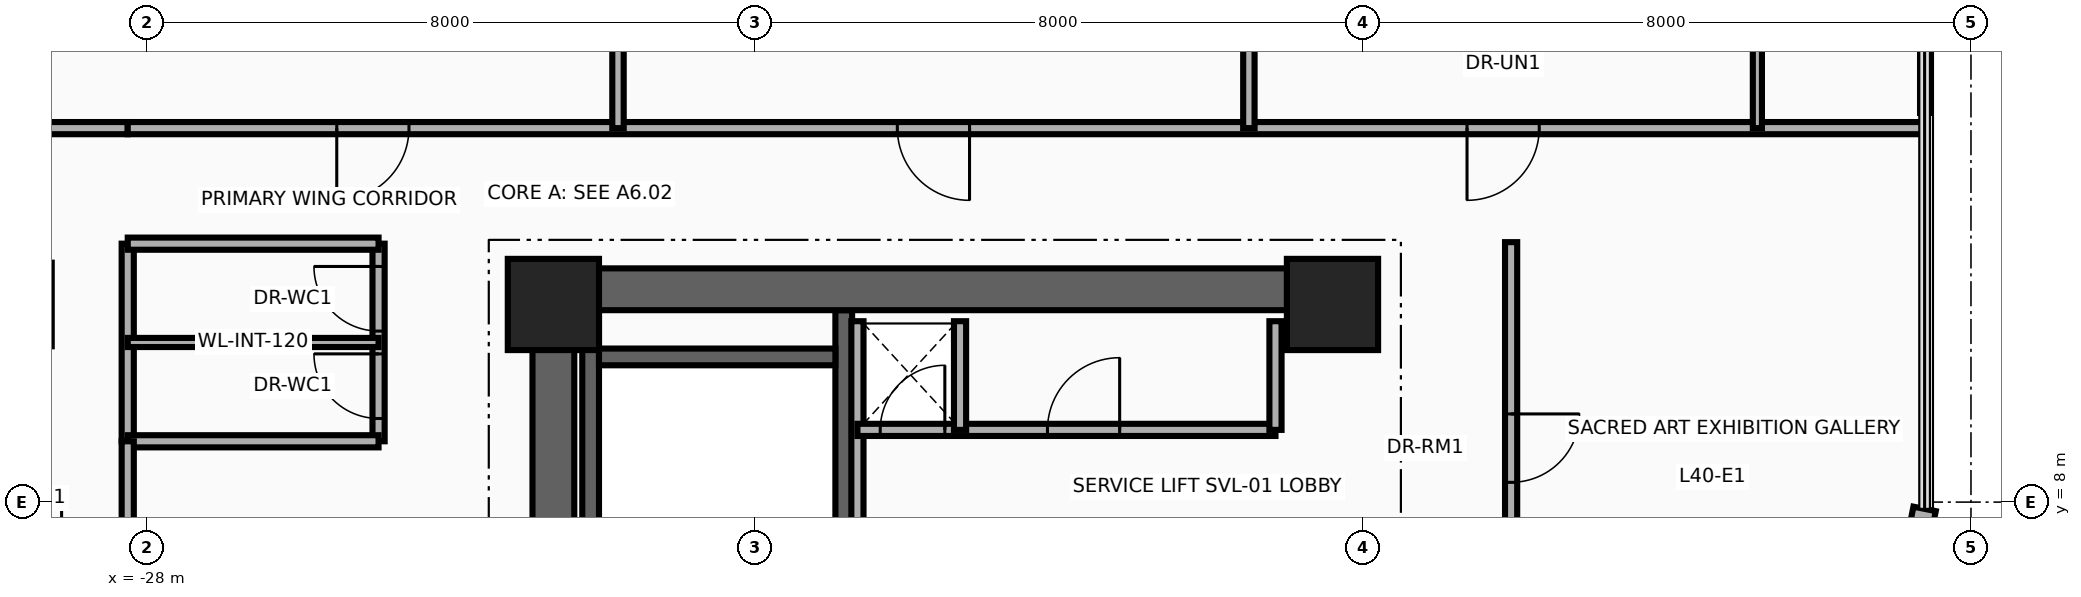
"""IFC4 building model, lengths in metres.
Left out: names, types, materials, properties, quantities, classifications, styles, units other than length and angle.
Written with IfcOpenShell. Run it as: python <this file> out.ifc"""

import sys

from ifc_helpers import new_model, si_unit, direction, frame, frame_2d, origin, origin_2d, place, context, subcontext, project, spatial, rectangle, extrude, source, transform, mapped, element, fill, save


model = new_model("IFC4")
c1 = context("Model", 3, precision=1e-05, world=origin(), true_north=direction((0.0, 1.0)))
c2 = subcontext(c1, "Body", "Model", "MODEL_VIEW")
j1 = project(units=[si_unit("LENGTHUNIT", "METRE"), si_unit("PLANEANGLEUNIT", "RADIAN")], contexts=[c1])
p1 = place(None, origin())
s1 = spatial("IfcSite", under=j1, at=p1, CompositionType="ELEMENT")
p2 = place(p1, origin())
s2 = spatial("IfcBuilding", under=s1, at=p2, CompositionType="ELEMENT")
p3 = place(p2, frame((0.0, 0.0, 157.5)))
s3 = spatial("IfcBuildingStorey", under=s2, at=p3, CompositionType="ELEMENT", Elevation=157.5)
for number, where, z_axis, x_axis in (
    (1, (-22.16, 1.78, 0.0), (0.0, 0.0, 1.0), (0.0, 1.0, 0.0)),
    (2, (-18.83, 1.78, 0.0), (0.0, 0.0, 1.0), (0.0, 1.0, 0.0)),
):
    element("IfcWall", number, at=place(p3, frame(where, z_axis=z_axis, x_axis=x_axis)), inside=s3, PredefinedType="SHEAR", context=c2, shape_type="SweptSolid", body=[
        extrude(rectangle(XDim=8.745, YDim=0.22, at=frame_2d((4.373, 0.0))), origin(), (0.0, 0.0, 1.0), 3.46),
    ])
p4 = place(p3, frame((-22.05, 9.91, 0.0), z_axis=(0.0, 0.0, 1.0), x_axis=(1.0, 0.0, 0.0)))
e3 = element("IfcWall", 3, at=p4, inside=s3, PredefinedType="SHEAR", context=c2, shape_type="SweptSolid", body=[
    extrude(rectangle(XDim=3.11, YDim=0.22, at=frame_2d((1.555, 0.0))), origin(), (0.0, 0.0, 1.0), 3.46),
])
p5 = place(p3, frame((-22.65, -11.075, 0.0), z_axis=(0.0, 0.0, 1.0), x_axis=(0.0, 1.0, 0.0)))
e4 = element("IfcWall", 4, at=p5, inside=s3, PredefinedType="SHEAR", context=c2, shape_type="SweptSolid", body=[
    extrude(rectangle(XDim=22.15, YDim=0.55, at=frame_2d((11.075, 0.0))), origin(), (0.0, 0.0, 1.0), 3.46),
])
p6 = place(p3, frame((-22.65, 10.8, 0.0), z_axis=(0.0, 0.0, 1.0), x_axis=(1.0, 0.0, 0.0)))
e5 = element("IfcWall", 5, at=p6, inside=s3, PredefinedType="SHEAR", context=c2, shape_type="SweptSolid", body=[
    extrude(rectangle(XDim=10.25, YDim=0.55, at=frame_2d((5.125, 0.0))), origin(), (0.0, 0.0, 1.0), 3.46),
])
m1 = source(origin(), c2, "Body", "SweptSolid", [
    extrude(rectangle(XDim=1.2, YDim=1.2, at=origin_2d()), origin(), (0.0, 0.0, 1.0), 3.7),
])
for number, where, z_axis, x_axis in (
    (6, (-22.65, 10.6, 0.0), (0.0, 0.0, 1.0), (1.0, 0.0, 0.0)),
    (7, (-12.4, 10.6, 0.0), (0.0, 0.0, 1.0), (1.0, 0.0, 0.0)),
):
    element("IfcColumn", number, at=place(p3, frame(where, z_axis=z_axis, x_axis=x_axis)), inside=s3, PredefinedType="COLUMN", context=c2, shape_type="MappedRepresentation", body=[
        mapped(m1, transform((0.0, 0.0, 0.0), x_axis=(1.0, 0.0, 0.0), y_axis=(0.0, 1.0, 0.0), z_axis=(0.0, 0.0, 1.0), scale=1.0)),
    ])
p7 = place(p3, frame((-4.61, 7.911, 0.0), z_axis=(0.0, 0.0, 1.0), x_axis=(-0.194989739953, -0.980805282058, 0.0)))
e8 = element("IfcWall", 8, at=p7, inside=s3, PredefinedType="SOLIDWALL", context=c2, shape_type="SweptSolid", body=[
    extrude(rectangle(XDim=0.709, YDim=0.3, at=frame_2d((0.354, 0.0))), origin(), (0.0, 0.0, 1.0), 3.46),
])
p8 = place(p3, frame((-18.65, 7.45, 0.0), z_axis=(0.0, 0.0, 1.0), x_axis=(0.0, 1.0, 0.0)))
e9 = element("IfcWall", 9, at=p8, inside=s3, PredefinedType="PARTITIONING", context=c2, shape_type="SweptSolid", body=[
    extrude(rectangle(XDim=2.93, YDim=0.16, at=frame_2d((1.465, 0.0))), origin(), (0.0, 0.0, 1.0), 3.46),
])
p9 = place(p3, frame((-18.65, 8.95, 0.0), z_axis=(0.0, 0.0, 1.0), x_axis=(1.0, 0.0, 0.0)))
e10 = element("IfcWall", 10, at=p9, inside=s3, PredefinedType="PARTITIONING", context=c2, shape_type="SweptSolid", body=[
    extrude(rectangle(XDim=5.5, YDim=0.16, at=frame_2d((2.75, 0.0))), origin(), (0.0, 0.0, 1.0), 3.46),
])
p10 = place(p9, frame((0.3, 0.0, 0.0)))
e11 = element("IfcOpeningElement", 11, at=p10, cuts=e10, PredefinedType="OPENING", context=c2, shape_type="SweptSolid", body=[
    extrude(rectangle(XDim=0.85, YDim=2.05, at=frame_2d((0.425, 1.025))), frame((0.0, 0.095, 0.0), z_axis=(0.0, -1.0, 0.0), x_axis=(1.0, 0.0, 0.0)), (0.0, 0.0, 1.0), 0.19),
])
p11 = place(p9, frame((2.5, 0.0, 0.0)))
e12 = element("IfcOpeningElement", 12, at=p11, cuts=e10, PredefinedType="OPENING", context=c2, shape_type="SweptSolid", body=[
    extrude(rectangle(XDim=0.95, YDim=2.15, at=frame_2d((0.475, 1.075))), frame((0.0, 0.095, 0.0), z_axis=(0.0, -1.0, 0.0), x_axis=(1.0, 0.0, 0.0)), (0.0, 0.0, 1.0), 0.19),
])
for number, where, z_axis, x_axis in (
    (13, (-13.15, 8.95, 0.0), (0.0, 0.0, 1.0), (0.0, 1.0, 0.0)),
    (14, (-17.3, 8.95, 0.0), (0.0, 0.0, 1.0), (0.0, 1.0, 0.0)),
):
    element("IfcWall", number, at=place(p3, frame(where, z_axis=z_axis, x_axis=x_axis)), inside=s3, PredefinedType="PARTITIONING", context=c2, shape_type="SweptSolid", body=[
        extrude(rectangle(XDim=1.43, YDim=0.16, at=frame_2d((0.715, 0.0))), origin(), (0.0, 0.0, 1.0), 3.46),
    ])
p12 = place(p3, frame((-28.25, 8.8, 0.0), z_axis=(0.0, 0.0, 1.0), x_axis=(0.0, 1.0, 0.0)))
e15 = element("IfcWall", 15, at=p12, inside=s3, PredefinedType="PARTITIONING", context=c2, shape_type="SweptSolid", body=[
    extrude(rectangle(XDim=2.6, YDim=0.16, at=frame_2d((1.3, 0.0))), origin(), (0.0, 0.0, 1.0), 2.666),
])
p13 = place(p3, frame((-24.95, 8.8, 0.0), z_axis=(0.0, 0.0, 1.0), x_axis=(0.0, 1.0, 0.0)))
e16 = element("IfcWall", 16, at=p13, inside=s3, PredefinedType="PARTITIONING", context=c2, shape_type="SweptSolid", body=[
    extrude(rectangle(XDim=2.6, YDim=0.16, at=frame_2d((1.3, 0.0))), origin(), (0.0, 0.0, 1.0), 2.666),
])
p14 = place(p13, frame((0.3, 0.0, 0.0)))
e17 = element("IfcOpeningElement", 17, at=p14, cuts=e16, PredefinedType="OPENING", context=c2, shape_type="SweptSolid", body=[
    extrude(rectangle(XDim=0.85, YDim=2.1, at=frame_2d((0.425, 1.05))), frame((0.0, 0.095, 0.0), z_axis=(0.0, -1.0, 0.0), x_axis=(1.0, 0.0, 0.0)), (0.0, 0.0, 1.0), 0.19),
])
p15 = place(p13, frame((1.45, 0.0, 0.0)))
e18 = element("IfcOpeningElement", 18, at=p15, cuts=e16, PredefinedType="OPENING", context=c2, shape_type="SweptSolid", body=[
    extrude(rectangle(XDim=0.85, YDim=2.1, at=frame_2d((0.425, 1.05))), frame((0.0, 0.095, 0.0), z_axis=(0.0, -1.0, 0.0), x_axis=(1.0, 0.0, 0.0)), (0.0, 0.0, 1.0), 0.19),
])
for number, where, z_axis, x_axis in (
    (19, (-28.25, 8.8, 0.0), (0.0, 0.0, 1.0), (1.0, 0.0, 0.0)),
    (20, (-28.25, 11.4, 0.0), (0.0, 0.0, 1.0), (1.0, 0.0, 0.0)),
):
    element("IfcWall", number, at=place(p3, frame(where, z_axis=z_axis, x_axis=x_axis)), inside=s3, PredefinedType="PARTITIONING", context=c2, shape_type="SweptSolid", body=[
        extrude(rectangle(XDim=3.3, YDim=0.16, at=frame_2d((1.65, 0.0))), origin(), (0.0, 0.0, 1.0), 3.46),
    ])
p16 = place(p3, frame((-28.25, 10.1, 0.0), z_axis=(0.0, 0.0, 1.0), x_axis=(1.0, 0.0, 0.0)))
e21 = element("IfcWall", 21, at=p16, inside=s3, PredefinedType="PARTITIONING", context=c2, shape_type="SweptSolid", body=[
    extrude(rectangle(XDim=3.3, YDim=0.12, at=frame_2d((1.65, 0.0))), origin(), (0.0, 0.0, 1.0), 3.46),
])
p17 = place(p3, frame((-28.25, 7.2, 0.0), z_axis=(0.0, 0.0, 1.0), x_axis=(0.0, 1.0, 0.0)))
e22 = element("IfcWall", 22, at=p17, inside=s3, PredefinedType="PARTITIONING", context=c2, shape_type="SweptSolid", body=[
    extrude(rectangle(XDim=1.6, YDim=0.16, at=frame_2d((0.8, 0.0))), origin(), (0.0, 0.0, 1.0), 2.988),
])
p18 = place(p3, frame((-32.54, 12.92, 0.0), z_axis=(0.0, 0.0, 1.0), x_axis=(1.0, 0.0, 0.0)))
e23 = element("IfcWall", 23, at=p18, inside=s3, PredefinedType="PARTITIONING", context=c2, shape_type="SweptSolid", body=[
    extrude(rectangle(XDim=4.29, YDim=0.16, at=frame_2d((2.145, 0.0))), origin(), (0.0, 0.0, 1.0), 2.896),
])
p19 = place(p3, frame((-28.25, 12.92, 0.0), z_axis=(0.0, 0.0, 1.0), x_axis=(1.0, 0.0, 0.0)))
e24 = element("IfcWall", 24, at=p19, inside=s3, PredefinedType="PARTITIONING", context=c2, shape_type="SweptSolid", body=[
    extrude(rectangle(XDim=23.64, YDim=0.16, at=frame_2d((11.82, 0.0))), origin(), (0.0, 0.0, 1.0), 2.834),
])
p20 = place(p19, frame((2.75, 0.0, 0.0)))
e25 = element("IfcOpeningElement", 25, at=p20, cuts=e24, PredefinedType="OPENING", context=c2, shape_type="SweptSolid", body=[
    extrude(rectangle(XDim=0.95, YDim=2.15, at=frame_2d((0.475, 1.075))), frame((0.0, 0.095, 0.0), z_axis=(0.0, -1.0, 0.0), x_axis=(1.0, 0.0, 0.0)), (0.0, 0.0, 1.0), 0.19),
])
p21 = place(p19, frame((10.125, 0.0, 0.0)))
e26 = element("IfcOpeningElement", 26, at=p21, cuts=e24, PredefinedType="OPENING", context=c2, shape_type="SweptSolid", body=[
    extrude(rectangle(XDim=0.95, YDim=2.15, at=frame_2d((0.475, 1.075))), frame((0.0, 0.095, 0.0), z_axis=(0.0, -1.0, 0.0), x_axis=(1.0, 0.0, 0.0)), (0.0, 0.0, 1.0), 0.19),
])
p22 = place(p19, frame((17.62, 0.0, 0.0)))
e27 = element("IfcOpeningElement", 27, at=p22, cuts=e24, PredefinedType="OPENING", context=c2, shape_type="SweptSolid", body=[
    extrude(rectangle(XDim=0.95, YDim=2.15, at=frame_2d((0.475, 1.075))), frame((0.0, 0.095, 0.0), z_axis=(0.0, -1.0, 0.0), x_axis=(1.0, 0.0, 0.0)), (0.0, 0.0, 1.0), 0.19),
])
p23 = place(p3, frame((-21.8, 12.92, 0.0), z_axis=(0.0, 0.0, 1.0), x_axis=(0.0, 1.0, 0.0)))
e28 = element("IfcWall", 28, at=p23, inside=s3, PredefinedType="PARTITIONING", context=c2, shape_type="SweptSolid", body=[
    extrude(rectangle(XDim=6.256, YDim=0.15, at=frame_2d((3.128, 0.0))), origin(), (0.0, 0.0, 1.0), 2.666),
])
p24 = place(p3, frame((-13.5, 12.92, 0.0), z_axis=(0.0, 0.0, 1.0), x_axis=(0.0, 1.0, 0.0)))
e29 = element("IfcWall", 29, at=p24, inside=s3, PredefinedType="PARTITIONING", context=c2, shape_type="SweptSolid", body=[
    extrude(rectangle(XDim=6.694, YDim=0.15, at=frame_2d((3.347, 0.0))), origin(), (0.0, 0.0, 1.0), 2.666),
])
p25 = place(p3, frame((-6.81, 12.92, 0.0), z_axis=(0.0, 0.0, 1.0), x_axis=(0.0, 1.0, 0.0)))
e30 = element("IfcWall", 30, at=p25, inside=s3, PredefinedType="PARTITIONING", context=c2, shape_type="SweptSolid", body=[
    extrude(rectangle(XDim=2.0, YDim=0.12, at=frame_2d((1.0, 0.0))), origin(), (0.0, 0.0, 1.0), 3.46),
])
p26 = place(p3, frame((-4.61, 13.12, 0.0), z_axis=(0.0, 0.0, 1.0), x_axis=(0.0, 1.0, 0.0)))
e31 = element("IfcWall", 31, at=p26, inside=s3, PredefinedType="PARTITIONING", context=c2, shape_type="SweptSolid", body=[
    extrude(rectangle(XDim=1.62, YDim=0.12, at=frame_2d((0.81, 0.0))), origin(), (0.0, 0.0, 1.0), 3.46),
])
p27 = place(p3, frame((-10.05, 6.0, 0.0), z_axis=(0.0, 0.0, 1.0), x_axis=(0.0, 1.0, 0.0)))
e32 = element("IfcWall", 32, at=p27, inside=s3, PredefinedType="PARTITIONING", context=c2, shape_type="SweptSolid", body=[
    extrude(rectangle(XDim=5.42, YDim=0.16, at=frame_2d((2.71, 0.0))), origin(), (0.0, 0.0, 1.0), 3.46),
])
p28 = place(p27, frame((2.26, 0.0, 0.0)))
e33 = element("IfcOpeningElement", 33, at=p28, cuts=e32, PredefinedType="OPENING", context=c2, shape_type="SweptSolid", body=[
    extrude(rectangle(XDim=0.9, YDim=2.1, at=frame_2d((0.45, 1.05))), frame((0.0, 0.095, 0.0), z_axis=(0.0, -1.0, 0.0), x_axis=(1.0, 0.0, 0.0)), (0.0, 0.0, 1.0), 0.19),
])
p29 = place(p10, origin())
e34 = element("IfcDoor", 34, at=p29, inside=s3, OperationType="SINGLE_SWING_LEFT", PredefinedType="DOOR", context=c2, shape_type="SweptSolid", body=[
    extrude(rectangle(XDim=0.85, YDim=2.05, at=frame_2d((0.425, 1.025))), frame((0.0, 0.025, 0.0), z_axis=(0.0, -1.0, 0.0), x_axis=(1.0, 0.0, 0.0)), (0.0, 0.0, 1.0), 0.05),
])
fill(e11, e34)
p30 = place(p11, origin())
e35 = element("IfcDoor", 35, at=p30, inside=s3, OperationType="SINGLE_SWING_RIGHT", PredefinedType="DOOR", context=c2, shape_type="SweptSolid", body=[
    extrude(rectangle(XDim=0.95, YDim=2.15, at=frame_2d((0.475, 1.075))), frame((0.0, 0.025, 0.0), z_axis=(0.0, -1.0, 0.0), x_axis=(1.0, 0.0, 0.0)), (0.0, 0.0, 1.0), 0.05),
])
fill(e12, e35)
p31 = place(p14, origin())
e36 = element("IfcDoor", 36, at=p31, inside=s3, OperationType="SINGLE_SWING_RIGHT", PredefinedType="DOOR", context=c2, shape_type="SweptSolid", body=[
    extrude(rectangle(XDim=0.85, YDim=2.1, at=frame_2d((0.425, 1.05))), frame((0.0, 0.025, 0.0), z_axis=(0.0, -1.0, 0.0), x_axis=(1.0, 0.0, 0.0)), (0.0, 0.0, 1.0), 0.05),
])
fill(e17, e36)
p32 = place(p15, origin())
e37 = element("IfcDoor", 37, at=p32, inside=s3, OperationType="SINGLE_SWING_LEFT", PredefinedType="DOOR", context=c2, shape_type="SweptSolid", body=[
    extrude(rectangle(XDim=0.85, YDim=2.1, at=frame_2d((0.425, 1.05))), frame((0.0, 0.025, 0.0), z_axis=(0.0, -1.0, 0.0), x_axis=(1.0, 0.0, 0.0)), (0.0, 0.0, 1.0), 0.05),
])
fill(e18, e37)
p33 = place(p20, frame((0.95, 0.0, 0.0), z_axis=(0.0, 0.0, 1.0), x_axis=(-1.0, 0.0, 0.0)))
e38 = element("IfcDoor", 38, at=p33, inside=s3, OperationType="SINGLE_SWING_LEFT", PredefinedType="DOOR", context=c2, shape_type="SweptSolid", body=[
    extrude(rectangle(XDim=0.95, YDim=2.15, at=frame_2d((0.475, 1.075))), frame((0.0, 0.025, 0.0), z_axis=(0.0, -1.0, 0.0), x_axis=(1.0, 0.0, 0.0)), (0.0, 0.0, 1.0), 0.05),
])
fill(e25, e38)
p34 = place(p21, frame((0.95, 0.0, 0.0), z_axis=(0.0, 0.0, 1.0), x_axis=(-1.0, 0.0, 0.0)))
e39 = element("IfcDoor", 39, at=p34, inside=s3, OperationType="SINGLE_SWING_LEFT", PredefinedType="DOOR", context=c2, shape_type="SweptSolid", body=[
    extrude(rectangle(XDim=0.95, YDim=2.15, at=frame_2d((0.475, 1.075))), frame((0.0, 0.025, 0.0), z_axis=(0.0, -1.0, 0.0), x_axis=(1.0, 0.0, 0.0)), (0.0, 0.0, 1.0), 0.05),
])
fill(e26, e39)
p35 = place(p22, frame((0.95, 0.0, 0.0), z_axis=(0.0, 0.0, 1.0), x_axis=(-1.0, 0.0, 0.0)))
e40 = element("IfcDoor", 40, at=p35, inside=s3, OperationType="SINGLE_SWING_LEFT", PredefinedType="DOOR", context=c2, shape_type="SweptSolid", body=[
    extrude(rectangle(XDim=0.95, YDim=2.15, at=frame_2d((0.475, 1.075))), frame((0.0, 0.025, 0.0), z_axis=(0.0, -1.0, 0.0), x_axis=(1.0, 0.0, 0.0)), (0.0, 0.0, 1.0), 0.05),
])
fill(e27, e40)
p36 = place(p28, frame((0.9, 0.0, 0.0), z_axis=(0.0, 0.0, 1.0), x_axis=(-1.0, 0.0, 0.0)))
e41 = element("IfcDoor", 41, at=p36, inside=s3, OperationType="SINGLE_SWING_LEFT", PredefinedType="DOOR", context=c2, shape_type="SweptSolid", body=[
    extrude(rectangle(XDim=0.9, YDim=2.1, at=frame_2d((0.45, 1.05))), frame((0.0, 0.025, 0.0), z_axis=(0.0, -1.0, 0.0), x_axis=(1.0, 0.0, 0.0)), (0.0, 0.0, 1.0), 0.05),
])
fill(e33, e41)
save(model, sys.argv[1])
